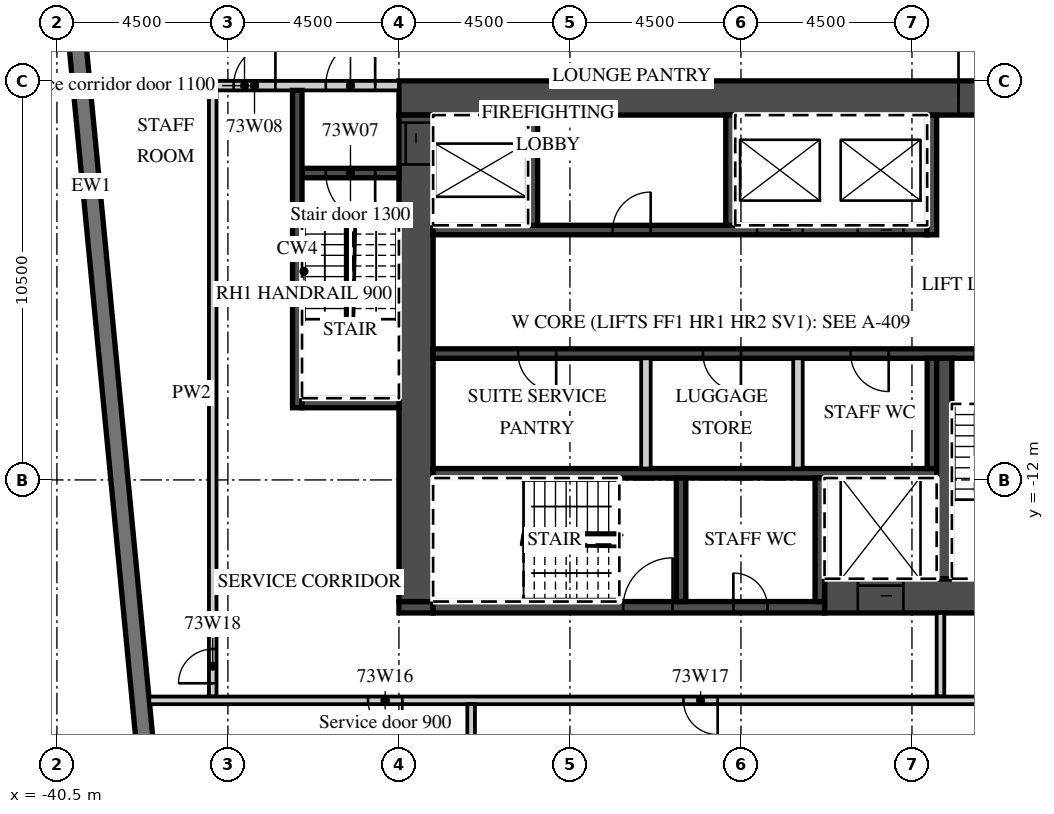
"""IFC4 building model, lengths in metres.
Left out: names, types, materials, properties, quantities, classifications, styles, units other than length and angle.
Written with IfcOpenShell. Run it as: python <this file> out.ifc"""

import sys

from ifc_helpers import new_model, si_unit, direction, frame, frame_2d, origin, place, context, subcontext, project, spatial, rectangle, extrude, element, fill, save


model = new_model("IFC4")
c1 = context("Model", 3, precision=1e-05, world=origin(), true_north=direction((0.0, 1.0)))
c2 = subcontext(c1, "Body", "Model", "MODEL_VIEW")
j1 = project(units=[si_unit("LENGTHUNIT", "METRE"), si_unit("PLANEANGLEUNIT", "RADIAN")], contexts=[c1])
p1 = place(None, origin())
s1 = spatial("IfcSite", under=j1, at=p1, CompositionType="ELEMENT")
p2 = place(p1, origin())
s2 = spatial("IfcBuilding", under=s1, at=p2, CompositionType="ELEMENT")
p3 = place(p2, frame((0.0, 0.0, 291.6)))
s3 = spatial("IfcBuildingStorey", under=s2, at=p3, CompositionType="ELEMENT", Elevation=291.6)
p4 = place(p3, frame((-41.132, 11.658, 0.0), z_axis=(0.0, 0.0, 1.0), x_axis=(0.095847749461, -0.995396006082, 0.0)))
e1 = element("IfcWall", 1, at=p4, inside=s3, PredefinedType="SOLIDWALL", context=c2, shape_type="SweptSolid", body=[
    extrude(rectangle(XDim=32.0, YDim=0.45, at=frame_2d((16.0, 0.0))), origin(), (0.0, 0.0, 1.0), 3.02),
])
p5 = place(p4, frame((2.053, 0.0, 0.45)))
e2 = element("IfcOpeningElement", 2, at=p5, cuts=e1, PredefinedType="OPENING", context=c2, shape_type="SweptSolid", body=[
    extrude(rectangle(XDim=3.3, YDim=2.25, at=frame_2d((1.65, 1.125))), frame((0.0, 0.235, 0.0), z_axis=(0.0, -1.0, 0.0), x_axis=(1.0, 0.0, 0.0)), (0.0, 0.0, 1.0), 0.47),
])
p6 = place(p4, frame((6.574, 0.0, 0.45)))
e3 = element("IfcOpeningElement", 3, at=p6, cuts=e1, PredefinedType="OPENING", context=c2, shape_type="SweptSolid", body=[
    extrude(rectangle(XDim=3.3, YDim=2.25, at=frame_2d((1.65, 1.125))), frame((0.0, 0.235, 0.0), z_axis=(0.0, -1.0, 0.0), x_axis=(1.0, 0.0, 0.0)), (0.0, 0.0, 1.0), 0.47),
])
p7 = place(p3, frame((-31.5, -1.95, 0.0), z_axis=(0.0, 0.0, 1.0), x_axis=(1.0, 0.0, 0.0)))
e4 = element("IfcWall", 4, at=p7, inside=s3, PredefinedType="SHEAR", context=c2, shape_type="SweptSolid", body=[
    extrude(rectangle(XDim=18.0, YDim=0.9, at=frame_2d((9.0, 0.0))), origin(), (0.0, 0.0, 1.0), 3.02),
])
p8 = place(p7, frame((14.725, 0.0, 0.0)))
e5 = element("IfcOpeningElement", 5, at=p8, cuts=e4, PredefinedType="OPENING", context=c2, shape_type="SweptSolid", body=[
    extrude(rectangle(XDim=1.8, YDim=2.1, at=frame_2d((0.9, 1.05))), frame((0.0, 0.46, 0.0), z_axis=(0.0, -1.0, 0.0), x_axis=(1.0, 0.0, 0.0)), (0.0, 0.0, 1.0), 0.92),
])
p9 = place(p3, frame((-20.3, -15.05, 0.0), z_axis=(0.0, 0.0, 1.0), x_axis=(1.0, 0.0, 0.0)))
e6 = element("IfcWall", 6, at=p9, inside=s3, PredefinedType="SHEAR", context=c2, shape_type="SweptSolid", body=[
    extrude(rectangle(XDim=6.8, YDim=0.9, at=frame_2d((3.4, 0.0))), origin(), (0.0, 0.0, 1.0), 3.02),
])
p10 = place(p9, frame((0.875, 0.0, 0.0)))
e7 = element("IfcOpeningElement", 7, at=p10, cuts=e6, PredefinedType="OPENING", context=c2, shape_type="SweptSolid", body=[
    extrude(rectangle(XDim=1.2, YDim=2.1, at=frame_2d((0.6, 1.05))), frame((0.0, 0.46, 0.0), z_axis=(0.0, -1.0, 0.0), x_axis=(1.0, 0.0, 0.0)), (0.0, 0.0, 1.0), 0.92),
])
p11 = place(p3, frame((-31.5, -15.35, 0.0), z_axis=(0.0, 0.0, 1.0), x_axis=(1.0, 0.0, 0.0)))
e8 = element("IfcWall", 8, at=p11, inside=s3, PredefinedType="SHEAR", context=c2, shape_type="SweptSolid", body=[
    extrude(rectangle(XDim=0.9, YDim=0.3, at=frame_2d((0.45, 0.0))), origin(), (0.0, 0.0, 1.0), 3.02),
])
p12 = place(p3, frame((-30.6, -15.35, 0.0), z_axis=(0.0, 0.0, 1.0), x_axis=(1.0, 0.0, 0.0)))
e9 = element("IfcWall", 9, at=p12, inside=s3, PredefinedType="SHEAR", context=c2, shape_type="SweptSolid", body=[
    extrude(rectangle(XDim=10.3, YDim=0.3, at=frame_2d((5.15, 0.0))), origin(), (0.0, 0.0, 1.0), 3.02),
])
p13 = place(p12, frame((5.0, 0.0, 0.0)))
e10 = element("IfcOpeningElement", 10, at=p13, cuts=e9, PredefinedType="OPENING", context=c2, shape_type="SweptSolid", body=[
    extrude(rectangle(XDim=1.3, YDim=2.1, at=frame_2d((0.65, 1.05))), frame((0.0, 0.16, 0.0), z_axis=(0.0, -1.0, 0.0), x_axis=(1.0, 0.0, 0.0)), (0.0, 0.0, 1.0), 0.32),
])
p14 = place(p12, frame((7.9, 0.0, 0.0)))
e11 = element("IfcOpeningElement", 11, at=p14, cuts=e9, PredefinedType="OPENING", context=c2, shape_type="SweptSolid", body=[
    extrude(rectangle(XDim=0.9, YDim=2.1, at=frame_2d((0.45, 1.05))), frame((0.0, 0.16, 0.0), z_axis=(0.0, -1.0, 0.0), x_axis=(1.0, 0.0, 0.0)), (0.0, 0.0, 1.0), 0.32),
])
p15 = place(p3, frame((-31.05, -15.2, 0.0), z_axis=(0.0, 0.0, 1.0), x_axis=(0.0, 1.0, 0.0)))
e12 = element("IfcWall", 12, at=p15, inside=s3, PredefinedType="SHEAR", context=c2, shape_type="SweptSolid", body=[
    extrude(rectangle(XDim=12.8, YDim=0.9, at=frame_2d((6.4, 0.0))), origin(), (0.0, 0.0, 1.0), 3.02),
])
p16 = place(p15, frame((11.5, 0.0, 0.0)))
e13 = element("IfcOpeningElement", 13, at=p16, cuts=e12, PredefinedType="OPENING", context=c2, shape_type="SweptSolid", body=[
    extrude(rectangle(XDim=1.1, YDim=2.1, at=frame_2d((0.55, 1.05))), frame((0.0, 0.46, 0.0), z_axis=(0.0, -1.0, 0.0), x_axis=(1.0, 0.0, 0.0)), (0.0, 0.0, 1.0), 0.92),
])
p17 = place(p3, frame((-30.6, -5.425, 0.0), z_axis=(0.0, 0.0, 1.0), x_axis=(1.0, 0.0, 0.0)))
e14 = element("IfcWall", 14, at=p17, inside=s3, PredefinedType="SHEAR", context=c2, shape_type="SweptSolid", body=[
    extrude(rectangle(XDim=13.0, YDim=0.25, at=frame_2d((6.5, 0.0))), origin(), (0.0, 0.0, 1.0), 3.02),
])
p18 = place(p17, frame((8.525, 0.0, 0.0)))
e15 = element("IfcOpeningElement", 15, at=p18, cuts=e14, PredefinedType="OPENING", context=c2, shape_type="SweptSolid", body=[
    extrude(rectangle(XDim=1.2, YDim=2.1, at=frame_2d((0.6, 1.05))), frame((0.0, 0.135, 0.0), z_axis=(0.0, -1.0, 0.0), x_axis=(1.0, 0.0, 0.0)), (0.0, 0.0, 1.0), 0.27),
])
p19 = place(p17, frame((11.175, 0.0, 0.0)))
e16 = element("IfcOpeningElement", 16, at=p19, cuts=e14, PredefinedType="OPENING", context=c2, shape_type="SweptSolid", body=[
    extrude(rectangle(XDim=1.2, YDim=2.1, at=frame_2d((0.6, 1.05))), frame((0.0, 0.135, 0.0), z_axis=(0.0, -1.0, 0.0), x_axis=(1.0, 0.0, 0.0)), (0.0, 0.0, 1.0), 0.27),
])
p20 = place(p17, frame((4.725, 0.0, 0.0)))
e17 = element("IfcOpeningElement", 17, at=p20, cuts=e14, PredefinedType="OPENING", context=c2, shape_type="SweptSolid", body=[
    extrude(rectangle(XDim=1.0, YDim=2.1, at=frame_2d((0.5, 1.05))), frame((0.0, 0.135, 0.0), z_axis=(0.0, -1.0, 0.0), x_axis=(1.0, 0.0, 0.0)), (0.0, 0.0, 1.0), 0.27),
])
p21 = place(p3, frame((-17.475, -5.55, 0.0), z_axis=(0.0, 0.0, 1.0), x_axis=(0.0, 1.0, 0.0)))
e18 = element("IfcWall", 18, at=p21, inside=s3, PredefinedType="SHEAR", context=c2, shape_type="SweptSolid", body=[
    extrude(rectangle(XDim=3.15, YDim=0.25, at=frame_2d((1.575, 0.0))), origin(), (0.0, 0.0, 1.0), 3.02),
])
for number, where, z_axis, x_axis in (
    (19, (-27.975, -5.3, 0.0), (0.0, 0.0, 1.0), (0.0, 1.0, 0.0)),
    (20, (-22.775, -5.3, 0.0), (0.0, 0.0, 1.0), (0.0, 1.0, 0.0)),
):
    element("IfcWall", number, at=place(p3, frame(where, z_axis=z_axis, x_axis=x_axis)), inside=s3, PredefinedType="SHEAR", context=c2, shape_type="SweptSolid", body=[
        extrude(rectangle(XDim=2.9, YDim=0.25, at=frame_2d((1.45, 0.0))), origin(), (0.0, 0.0, 1.0), 3.02),
    ])
p22 = place(p3, frame((-30.6, -8.675, 0.0), z_axis=(0.0, 0.0, 1.0), x_axis=(1.0, 0.0, 0.0)))
e21 = element("IfcWall", 21, at=p22, inside=s3, PredefinedType="SHEAR", context=c2, shape_type="SweptSolid", body=[
    extrude(rectangle(XDim=16.2, YDim=0.25, at=frame_2d((8.1, 0.0))), origin(), (0.0, 0.0, 1.0), 3.02),
])
p23 = place(p22, frame((14.25, 0.0, 0.0)))
e22 = element("IfcOpeningElement", 22, at=p23, cuts=e21, PredefinedType="OPENING", context=c2, shape_type="SweptSolid", body=[
    extrude(rectangle(XDim=1.3, YDim=2.1, at=frame_2d((0.65, 1.05))), frame((0.0, 0.135, 0.0), z_axis=(0.0, -1.0, 0.0), x_axis=(1.0, 0.0, 0.0)), (0.0, 0.0, 1.0), 0.27),
])
p24 = place(p22, frame((2.238, 0.0, 0.0)))
e23 = element("IfcOpeningElement", 23, at=p24, cuts=e21, PredefinedType="OPENING", context=c2, shape_type="SweptSolid", body=[
    extrude(rectangle(XDim=1.0, YDim=2.1, at=frame_2d((0.5, 1.05))), frame((0.0, 0.135, 0.0), z_axis=(0.0, -1.0, 0.0), x_axis=(1.0, 0.0, 0.0)), (0.0, 0.0, 1.0), 0.27),
])
p25 = place(p22, frame((7.1, 0.0, 0.0)))
e24 = element("IfcOpeningElement", 24, at=p25, cuts=e21, PredefinedType="OPENING", context=c2, shape_type="SweptSolid", body=[
    extrude(rectangle(XDim=1.0, YDim=2.1, at=frame_2d((0.5, 1.05))), frame((0.0, 0.135, 0.0), z_axis=(0.0, -1.0, 0.0), x_axis=(1.0, 0.0, 0.0)), (0.0, 0.0, 1.0), 0.27),
])
p26 = place(p22, frame((10.988, 0.0, 0.0)))
e25 = element("IfcOpeningElement", 25, at=p26, cuts=e21, PredefinedType="OPENING", context=c2, shape_type="SweptSolid", body=[
    extrude(rectangle(XDim=1.0, YDim=2.1, at=frame_2d((0.5, 1.05))), frame((0.0, 0.135, 0.0), z_axis=(0.0, -1.0, 0.0), x_axis=(1.0, 0.0, 0.0)), (0.0, 0.0, 1.0), 0.27),
])
p27 = place(p3, frame((-30.6, -11.825, 0.0), z_axis=(0.0, 0.0, 1.0), x_axis=(1.0, 0.0, 0.0)))
e26 = element("IfcWall", 26, at=p27, inside=s3, PredefinedType="SHEAR", context=c2, shape_type="SweptSolid", body=[
    extrude(rectangle(XDim=13.25, YDim=0.25, at=frame_2d((6.625, 0.0))), origin(), (0.0, 0.0, 1.0), 3.02),
])
p28 = place(p3, frame((-17.475, -11.7, 0.0), z_axis=(0.0, 0.0, 1.0), x_axis=(0.0, 1.0, 0.0)))
e27 = element("IfcWall", 27, at=p28, inside=s3, PredefinedType="SHEAR", context=c2, shape_type="SweptSolid", body=[
    extrude(rectangle(XDim=2.9, YDim=0.25, at=frame_2d((1.45, 0.0))), origin(), (0.0, 0.0, 1.0), 3.02),
])
for number, where, z_axis, x_axis in (
    (28, (-25.0, -11.7, 0.0), (0.0, 0.0, 1.0), (0.0, 1.0, 0.0)),
    (29, (-21.0, -11.7, 0.0), (0.0, 0.0, 1.0), (0.0, 1.0, 0.0)),
):
    element("IfcWall", number, at=place(p3, frame(where, z_axis=z_axis, x_axis=x_axis)), inside=s3, PredefinedType="PARTITIONING", context=c2, shape_type="SweptSolid", body=[
        extrude(rectangle(XDim=2.9, YDim=0.25, at=frame_2d((1.45, 0.0))), origin(), (0.0, 0.0, 1.0), 3.02),
    ])
p29 = place(p3, frame((-17.15, -14.6, 0.0), z_axis=(0.0, 0.0, 1.0), x_axis=(0.0, 1.0, 0.0)))
e30 = element("IfcWall", 30, at=p29, inside=s3, PredefinedType="SHEAR", context=c2, shape_type="SweptSolid", body=[
    extrude(rectangle(XDim=5.8, YDim=0.4, at=frame_2d((2.9, 0.0))), origin(), (0.0, 0.0, 1.0), 3.02),
])
for number, where, z_axis, x_axis in (
    (31, (-20.425, -15.2, 0.0), (0.0, 0.0, 1.0), (0.0, 1.0, 0.0)),
    (32, (-24.075, -15.2, 0.0), (0.0, 0.0, 1.0), (0.0, 1.0, 0.0)),
):
    element("IfcWall", number, at=place(p3, frame(where, z_axis=z_axis, x_axis=x_axis)), inside=s3, PredefinedType="SHEAR", context=c2, shape_type="SweptSolid", body=[
        extrude(rectangle(XDim=3.25, YDim=0.25, at=frame_2d((1.625, 0.0))), origin(), (0.0, 0.0, 1.0), 3.02),
    ])
p30 = place(p3, frame((-39.627, -1.625, 0.0), z_axis=(0.0, 0.0, 1.0), x_axis=(1.0, 0.0, 0.0)))
e33 = element("IfcWall", 33, at=p30, inside=s3, PredefinedType="PARTITIONING", context=c2, shape_type="SweptSolid", body=[
    extrude(rectangle(XDim=8.127, YDim=0.25, at=frame_2d((4.063, 0.0))), origin(), (0.0, 0.0, 1.0), 3.02),
])
p31 = place(p30, frame((6.202, 0.0, 0.0)))
e34 = element("IfcOpeningElement", 34, at=p31, cuts=e33, PredefinedType="OPENING", context=c2, shape_type="SweptSolid", body=[
    extrude(rectangle(XDim=1.3, YDim=2.1, at=frame_2d((0.65, 1.05))), frame((0.0, 0.135, 0.0), z_axis=(0.0, -1.0, 0.0), x_axis=(1.0, 0.0, 0.0)), (0.0, 0.0, 1.0), 0.27),
])
p32 = place(p30, frame((3.777, 0.0, 0.0)))
e35 = element("IfcOpeningElement", 35, at=p32, cuts=e33, PredefinedType="OPENING", context=c2, shape_type="SweptSolid", body=[
    extrude(rectangle(XDim=1.1, YDim=2.1, at=frame_2d((0.55, 1.05))), frame((0.0, 0.135, 0.0), z_axis=(0.0, -1.0, 0.0), x_axis=(1.0, 0.0, 0.0)), (0.0, 0.0, 1.0), 0.27),
])
p33 = place(p3, frame((-34.05, -3.925, 0.0), z_axis=(0.0, 0.0, 1.0), x_axis=(1.0, 0.0, 0.0)))
e36 = element("IfcWall", 36, at=p33, inside=s3, PredefinedType="SHEAR", context=c2, shape_type="SweptSolid", body=[
    extrude(rectangle(XDim=2.55, YDim=0.25, at=frame_2d((1.275, 0.0))), origin(), (0.0, 0.0, 1.0), 3.02),
])
p34 = place(p33, frame((0.625, 0.0, 0.0)))
e37 = element("IfcOpeningElement", 37, at=p34, cuts=e36, PredefinedType="OPENING", context=c2, shape_type="SweptSolid", body=[
    extrude(rectangle(XDim=1.3, YDim=2.1, at=frame_2d((0.65, 1.05))), frame((0.0, 0.135, 0.0), z_axis=(0.0, -1.0, 0.0), x_axis=(1.0, 0.0, 0.0)), (0.0, 0.0, 1.0), 0.27),
])
p35 = place(p3, frame((-34.175, -10.1, 0.0), z_axis=(0.0, 0.0, 1.0), x_axis=(0.0, 1.0, 0.0)))
e38 = element("IfcWall", 38, at=p35, inside=s3, PredefinedType="SHEAR", context=c2, shape_type="SweptSolid", body=[
    extrude(rectangle(XDim=8.35, YDim=0.25, at=frame_2d((4.175, 0.0))), origin(), (0.0, 0.0, 1.0), 3.02),
])
p36 = place(p3, frame((-34.05, -9.975, 0.0), z_axis=(0.0, 0.0, 1.0), x_axis=(1.0, 0.0, 0.0)))
e39 = element("IfcWall", 39, at=p36, inside=s3, PredefinedType="SHEAR", context=c2, shape_type="SweptSolid", body=[
    extrude(rectangle(XDim=2.55, YDim=0.25, at=frame_2d((1.275, 0.0))), origin(), (0.0, 0.0, 1.0), 3.02),
])
p37 = place(p3, frame((-17.25, -17.7, 0.0), z_axis=(0.0, 0.0, 1.0), x_axis=(0.0, 1.0, 0.0)))
e40 = element("IfcWall", 40, at=p37, inside=s3, PredefinedType="PARTITIONING", context=c2, shape_type="SweptSolid", body=[
    extrude(rectangle(XDim=2.2, YDim=0.2, at=frame_2d((1.1, 0.0))), origin(), (0.0, 0.0, 1.0), 3.02),
])
p38 = place(p3, frame((-36.4, -17.7, 0.0), z_axis=(0.0, 0.0, 1.0), x_axis=(0.0, 1.0, 0.0)))
e41 = element("IfcWall", 41, at=p38, inside=s3, PredefinedType="PARTITIONING", context=c2, shape_type="SweptSolid", body=[
    extrude(rectangle(XDim=15.95, YDim=0.2, at=frame_2d((7.975, 0.0))), origin(), (0.0, 0.0, 1.0), 3.02),
])
p39 = place(p38, frame((0.35, 0.0, 0.0)))
e42 = element("IfcOpeningElement", 42, at=p39, cuts=e41, PredefinedType="OPENING", context=c2, shape_type="SweptSolid", body=[
    extrude(rectangle(XDim=0.9, YDim=2.1, at=frame_2d((0.45, 1.05))), frame((0.0, 0.11, 0.0), z_axis=(0.0, -1.0, 0.0), x_axis=(1.0, 0.0, 0.0)), (0.0, 0.0, 1.0), 0.22),
])
p40 = place(p3, frame((-38.07, -17.8, 0.0), z_axis=(0.0, 0.0, 1.0), x_axis=(1.0, 0.0, 0.0)))
e43 = element("IfcWall", 43, at=p40, inside=s3, PredefinedType="PARTITIONING", context=c2, shape_type="SweptSolid", body=[
    extrude(rectangle(XDim=24.47, YDim=0.2, at=frame_2d((12.235, 0.0))), origin(), (0.0, 0.0, 1.0), 3.02),
])
p41 = place(p40, frame((5.757, 0.0, 0.0)))
e44 = element("IfcOpeningElement", 44, at=p41, cuts=e43, PredefinedType="OPENING", context=c2, shape_type="SweptSolid", body=[
    extrude(rectangle(XDim=0.9, YDim=2.1, at=frame_2d((0.45, 1.05))), frame((0.0, 0.11, 0.0), z_axis=(0.0, -1.0, 0.0), x_axis=(1.0, 0.0, 0.0)), (0.0, 0.0, 1.0), 0.22),
])
p42 = place(p40, frame((14.057, 0.0, 0.0)))
e45 = element("IfcOpeningElement", 45, at=p42, cuts=e43, PredefinedType="OPENING", context=c2, shape_type="SweptSolid", body=[
    extrude(rectangle(XDim=0.9, YDim=2.1, at=frame_2d((0.45, 1.05))), frame((0.0, 0.11, 0.0), z_axis=(0.0, -1.0, 0.0), x_axis=(1.0, 0.0, 0.0)), (0.0, 0.0, 1.0), 0.22),
])
p43 = place(p3, frame((-29.6, -22.947, 0.0), z_axis=(0.0, 0.0, 1.0), x_axis=(0.0, 1.0, 0.0)))
e46 = element("IfcWall", 46, at=p43, inside=s3, PredefinedType="PARTITIONING", context=c2, shape_type="SweptSolid", body=[
    extrude(rectangle(XDim=5.047, YDim=0.2, at=frame_2d((2.523, 0.0))), origin(), (0.0, 0.0, 1.0), 3.02),
])
p44 = place(p18, origin())
e47 = element("IfcDoor", 47, at=p44, inside=s3, OperationType="SLIDING_TO_LEFT", PredefinedType="DOOR", context=c2, shape_type="SweptSolid", body=[
    extrude(rectangle(XDim=1.2, YDim=2.1, at=frame_2d((0.6, 1.05))), frame((0.0, 0.025, 0.0), z_axis=(0.0, -1.0, 0.0), x_axis=(1.0, 0.0, 0.0)), (0.0, 0.0, 1.0), 0.05),
])
fill(e15, e47)
p45 = place(p19, origin())
e48 = element("IfcDoor", 48, at=p45, inside=s3, OperationType="SLIDING_TO_RIGHT", PredefinedType="DOOR", context=c2, shape_type="SweptSolid", body=[
    extrude(rectangle(XDim=1.2, YDim=2.1, at=frame_2d((0.6, 1.05))), frame((0.0, 0.025, 0.0), z_axis=(0.0, -1.0, 0.0), x_axis=(1.0, 0.0, 0.0)), (0.0, 0.0, 1.0), 0.05),
])
fill(e16, e48)
p46 = place(p10, origin())
e49 = element("IfcDoor", 49, at=p46, inside=s3, OperationType="SLIDING_TO_LEFT", PredefinedType="DOOR", context=c2, shape_type="SweptSolid", body=[
    extrude(rectangle(XDim=1.2, YDim=2.1, at=frame_2d((0.6, 1.05))), frame((0.0, 0.025, 0.0), z_axis=(0.0, -1.0, 0.0), x_axis=(1.0, 0.0, 0.0)), (0.0, 0.0, 1.0), 0.05),
])
fill(e7, e49)
p47 = place(p16, origin())
e50 = element("IfcDoor", 50, at=p47, inside=s3, OperationType="SLIDING_TO_RIGHT", PredefinedType="DOOR", context=c2, shape_type="SweptSolid", body=[
    extrude(rectangle(XDim=1.1, YDim=2.1, at=frame_2d((0.55, 1.05))), frame((0.0, 0.025, 0.0), z_axis=(0.0, -1.0, 0.0), x_axis=(1.0, 0.0, 0.0)), (0.0, 0.0, 1.0), 0.05),
])
fill(e13, e50)
p48 = place(p8, origin())
e51 = element("IfcDoor", 51, at=p48, inside=s3, OperationType="DOUBLE_DOOR_DOUBLE_SWING", PredefinedType="DOOR", context=c2, shape_type="SweptSolid", body=[
    extrude(rectangle(XDim=1.8, YDim=2.1, at=frame_2d((0.9, 1.05))), frame((0.0, 0.025, 0.0), z_axis=(0.0, -1.0, 0.0), x_axis=(1.0, 0.0, 0.0)), (0.0, 0.0, 1.0), 0.05),
])
fill(e5, e51)
p49 = place(p31, origin())
e52 = element("IfcDoor", 52, at=p49, inside=s3, OperationType="SINGLE_SWING_RIGHT", PredefinedType="DOOR", context=c2, shape_type="SweptSolid", body=[
    extrude(rectangle(XDim=1.3, YDim=2.1, at=frame_2d((0.65, 1.05))), frame((0.0, 0.025, 0.0), z_axis=(0.0, -1.0, 0.0), x_axis=(1.0, 0.0, 0.0)), (0.0, 0.0, 1.0), 0.05),
])
fill(e34, e52)
p50 = place(p34, origin())
e53 = element("IfcDoor", 53, at=p50, inside=s3, OperationType="SINGLE_SWING_RIGHT", PredefinedType="DOOR", context=c2, shape_type="SweptSolid", body=[
    extrude(rectangle(XDim=1.3, YDim=2.1, at=frame_2d((0.65, 1.05))), frame((0.0, 0.025, 0.0), z_axis=(0.0, -1.0, 0.0), x_axis=(1.0, 0.0, 0.0)), (0.0, 0.0, 1.0), 0.05),
])
fill(e37, e53)
p51 = place(p32, origin())
e54 = element("IfcDoor", 54, at=p51, inside=s3, OperationType="SINGLE_SWING_RIGHT", PredefinedType="DOOR", context=c2, shape_type="SweptSolid", body=[
    extrude(rectangle(XDim=1.1, YDim=2.1, at=frame_2d((0.55, 1.05))), frame((0.0, 0.025, 0.0), z_axis=(0.0, -1.0, 0.0), x_axis=(1.0, 0.0, 0.0)), (0.0, 0.0, 1.0), 0.05),
])
fill(e35, e54)
p52 = place(p23, origin())
e55 = element("IfcDoor", 55, at=p52, inside=s3, OperationType="SINGLE_SWING_RIGHT", PredefinedType="DOOR", context=c2, shape_type="SweptSolid", body=[
    extrude(rectangle(XDim=1.3, YDim=2.1, at=frame_2d((0.65, 1.05))), frame((0.0, 0.025, 0.0), z_axis=(0.0, -1.0, 0.0), x_axis=(1.0, 0.0, 0.0)), (0.0, 0.0, 1.0), 0.05),
])
fill(e22, e55)
p53 = place(p13, origin())
e56 = element("IfcDoor", 56, at=p53, inside=s3, OperationType="SINGLE_SWING_RIGHT", PredefinedType="DOOR", context=c2, shape_type="SweptSolid", body=[
    extrude(rectangle(XDim=1.3, YDim=2.1, at=frame_2d((0.65, 1.05))), frame((0.0, 0.025, 0.0), z_axis=(0.0, -1.0, 0.0), x_axis=(1.0, 0.0, 0.0)), (0.0, 0.0, 1.0), 0.05),
])
fill(e10, e56)
p54 = place(p14, origin())
e57 = element("IfcDoor", 57, at=p54, inside=s3, OperationType="SINGLE_SWING_LEFT", PredefinedType="DOOR", context=c2, shape_type="SweptSolid", body=[
    extrude(rectangle(XDim=0.9, YDim=2.1, at=frame_2d((0.45, 1.05))), frame((0.0, 0.025, 0.0), z_axis=(0.0, -1.0, 0.0), x_axis=(1.0, 0.0, 0.0)), (0.0, 0.0, 1.0), 0.05),
])
fill(e11, e57)
p55 = place(p24, origin())
e58 = element("IfcDoor", 58, at=p55, inside=s3, OperationType="SINGLE_SWING_RIGHT", PredefinedType="DOOR", context=c2, shape_type="SweptSolid", body=[
    extrude(rectangle(XDim=1.0, YDim=2.1, at=frame_2d((0.5, 1.05))), frame((0.0, 0.025, 0.0), z_axis=(0.0, -1.0, 0.0), x_axis=(1.0, 0.0, 0.0)), (0.0, 0.0, 1.0), 0.05),
])
fill(e23, e58)
p56 = place(p25, origin())
e59 = element("IfcDoor", 59, at=p56, inside=s3, OperationType="SINGLE_SWING_RIGHT", PredefinedType="DOOR", context=c2, shape_type="SweptSolid", body=[
    extrude(rectangle(XDim=1.0, YDim=2.1, at=frame_2d((0.5, 1.05))), frame((0.0, 0.025, 0.0), z_axis=(0.0, -1.0, 0.0), x_axis=(1.0, 0.0, 0.0)), (0.0, 0.0, 1.0), 0.05),
])
fill(e24, e59)
p57 = place(p26, origin())
e60 = element("IfcDoor", 60, at=p57, inside=s3, OperationType="SINGLE_SWING_RIGHT", PredefinedType="DOOR", context=c2, shape_type="SweptSolid", body=[
    extrude(rectangle(XDim=1.0, YDim=2.1, at=frame_2d((0.5, 1.05))), frame((0.0, 0.025, 0.0), z_axis=(0.0, -1.0, 0.0), x_axis=(1.0, 0.0, 0.0)), (0.0, 0.0, 1.0), 0.05),
])
fill(e25, e60)
p58 = place(p20, origin())
e61 = element("IfcDoor", 61, at=p58, inside=s3, OperationType="SINGLE_SWING_RIGHT", PredefinedType="DOOR", context=c2, shape_type="SweptSolid", body=[
    extrude(rectangle(XDim=1.0, YDim=2.1, at=frame_2d((0.5, 1.05))), frame((0.0, 0.025, 0.0), z_axis=(0.0, -1.0, 0.0), x_axis=(1.0, 0.0, 0.0)), (0.0, 0.0, 1.0), 0.05),
])
fill(e17, e61)
p59 = place(p41, origin())
e62 = element("IfcDoor", 62, at=p59, inside=s3, OperationType="SINGLE_SWING_RIGHT", PredefinedType="DOOR", context=c2, shape_type="SweptSolid", body=[
    extrude(rectangle(XDim=0.9, YDim=2.1, at=frame_2d((0.45, 1.05))), frame((0.0, 0.025, 0.0), z_axis=(0.0, -1.0, 0.0), x_axis=(1.0, 0.0, 0.0)), (0.0, 0.0, 1.0), 0.05),
])
fill(e44, e62)
p60 = place(p42, origin())
e63 = element("IfcDoor", 63, at=p60, inside=s3, OperationType="SINGLE_SWING_RIGHT", PredefinedType="DOOR", context=c2, shape_type="SweptSolid", body=[
    extrude(rectangle(XDim=0.9, YDim=2.1, at=frame_2d((0.45, 1.05))), frame((0.0, 0.025, 0.0), z_axis=(0.0, -1.0, 0.0), x_axis=(1.0, 0.0, 0.0)), (0.0, 0.0, 1.0), 0.05),
])
fill(e45, e63)
p61 = place(p39, origin())
e64 = element("IfcDoor", 64, at=p61, inside=s3, OperationType="SINGLE_SWING_LEFT", PredefinedType="DOOR", context=c2, shape_type="SweptSolid", body=[
    extrude(rectangle(XDim=0.9, YDim=2.1, at=frame_2d((0.45, 1.05))), frame((0.0, 0.025, 0.0), z_axis=(0.0, -1.0, 0.0), x_axis=(1.0, 0.0, 0.0)), (0.0, 0.0, 1.0), 0.05),
])
fill(e42, e64)
save(model, sys.argv[1])
